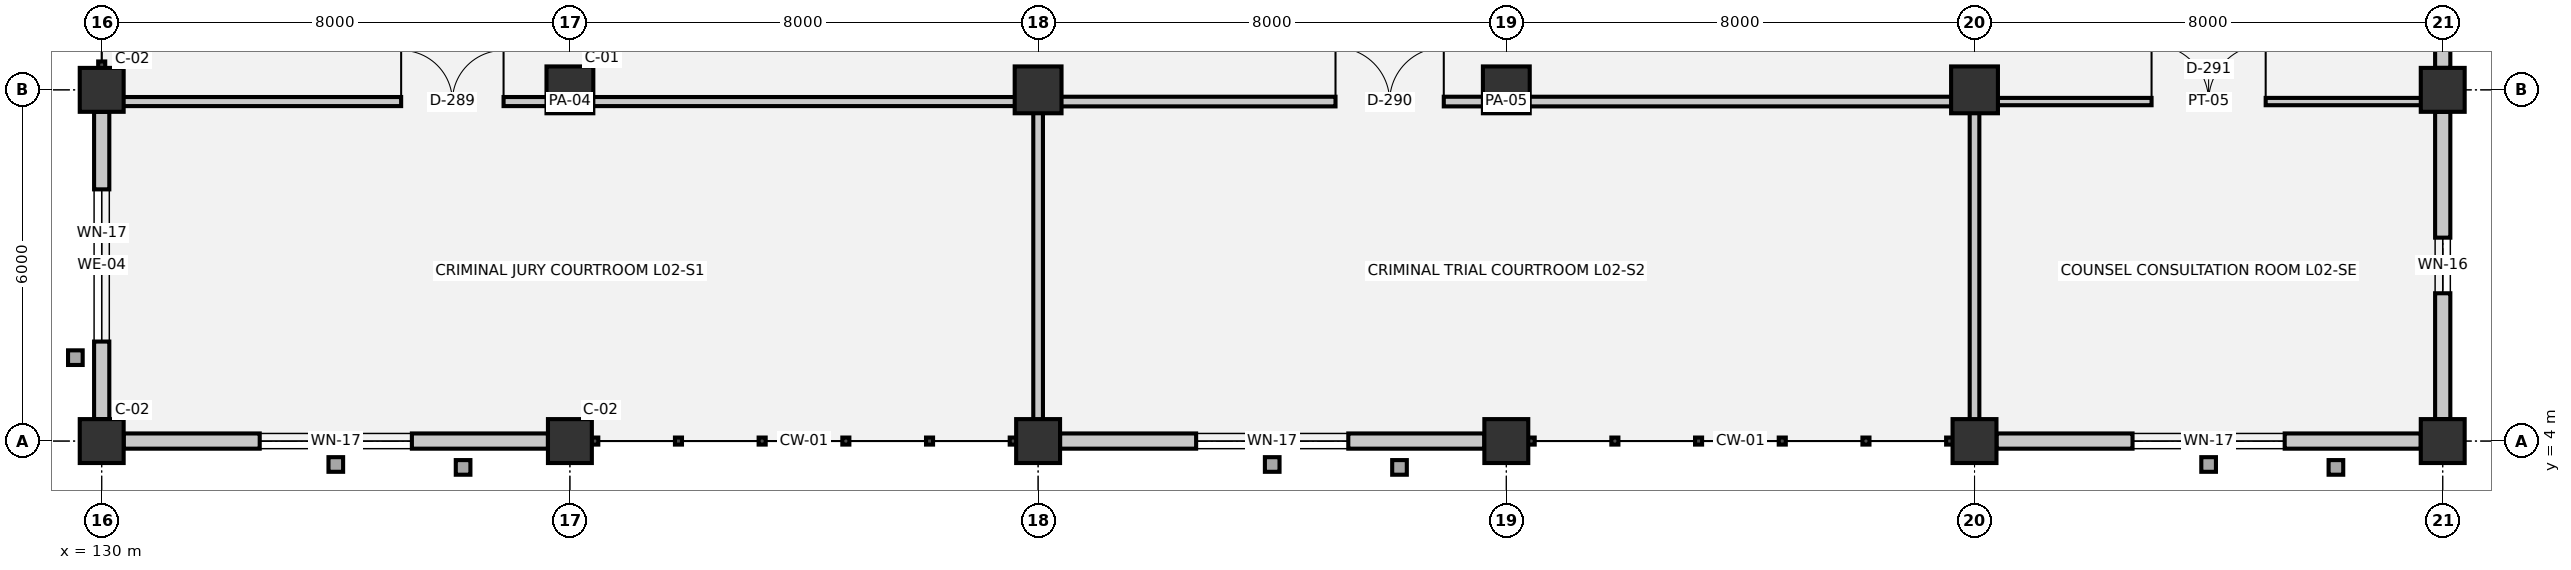
"""IFC4 building model, lengths in metres.
Left out: names, types, materials, properties, quantities, classifications, styles, units other than length and angle.
Written with IfcOpenShell. Run it as: python <this file> out.ifc"""

import sys

from ifc_helpers import new_model, si_unit, direction, frame, frame_2d, origin, origin_2d, place, context, subcontext, project, spatial, rectangle, extrude, element, fill, save


model = new_model("IFC4")
c1 = context("Model", 3, precision=1e-05, world=origin(), true_north=direction((0.0, 1.0)))
c2 = subcontext(c1, "Body", "Model", "MODEL_VIEW")
j1 = project(units=[si_unit("LENGTHUNIT", "METRE"), si_unit("PLANEANGLEUNIT", "RADIAN")], contexts=[c1])
p1 = place(None, origin())
s1 = spatial("IfcSite", under=j1, at=p1, CompositionType="ELEMENT")
p2 = place(p1, origin())
s2 = spatial("IfcBuilding", under=s1, at=p2, CompositionType="ELEMENT")
p3 = place(p2, frame((0.0, 0.0, 5.4)))
s3 = spatial("IfcBuildingStorey", under=s2, at=p3, CompositionType="ELEMENT", Elevation=5.4)
for number, where, z_axis, x_axis in (
    (1, (130.0, 4.0, 0.0), (0.0, 0.0, 1.0), (1.0, 0.0, 0.0)),
    (2, (130.0, 10.0, 0.0), (0.0, 0.0, 1.0), (1.0, 0.0, 0.0)),
    (3, (138.0, 4.0, 0.0), (0.0, 0.0, 1.0), (1.0, 0.0, 0.0)),
):
    element("IfcColumn", number, at=place(p3, frame(where, z_axis=z_axis, x_axis=x_axis)), inside=s3, PredefinedType="COLUMN", context=c2, shape_type="SweptSolid", body=[
        extrude(rectangle(XDim=0.75, YDim=0.75, at=origin_2d()), origin(), (0.0, 0.0, 1.0), 4.5),
    ])
p4 = place(p3, frame((138.0, 10.0, 0.0), z_axis=(0.0, 0.0, 1.0), x_axis=(1.0, 0.0, 0.0)))
e4 = element("IfcColumn", 4, at=p4, inside=s3, PredefinedType="COLUMN", context=c2, shape_type="SweptSolid", body=[
    extrude(rectangle(XDim=0.8, YDim=0.8, at=origin_2d()), origin(), (0.0, 0.0, 1.0), 4.5),
])
p5 = place(p3, frame((146.0, 4.0, 0.0), z_axis=(0.0, 0.0, 1.0), x_axis=(1.0, 0.0, 0.0)))
e5 = element("IfcColumn", 5, at=p5, inside=s3, PredefinedType="COLUMN", context=c2, shape_type="SweptSolid", body=[
    extrude(rectangle(XDim=0.75, YDim=0.75, at=origin_2d()), origin(), (0.0, 0.0, 1.0), 4.5),
])
p6 = place(p3, frame((146.0, 10.0, 0.0), z_axis=(0.0, 0.0, 1.0), x_axis=(1.0, 0.0, 0.0)))
e6 = element("IfcColumn", 6, at=p6, inside=s3, PredefinedType="COLUMN", context=c2, shape_type="SweptSolid", body=[
    extrude(rectangle(XDim=0.8, YDim=0.8, at=origin_2d()), origin(), (0.0, 0.0, 1.0), 4.5),
])
p7 = place(p3, frame((154.0, 4.0, 0.0), z_axis=(0.0, 0.0, 1.0), x_axis=(1.0, 0.0, 0.0)))
e7 = element("IfcColumn", 7, at=p7, inside=s3, PredefinedType="COLUMN", context=c2, shape_type="SweptSolid", body=[
    extrude(rectangle(XDim=0.75, YDim=0.75, at=origin_2d()), origin(), (0.0, 0.0, 1.0), 4.5),
])
p8 = place(p3, frame((154.0, 10.0, 0.0), z_axis=(0.0, 0.0, 1.0), x_axis=(1.0, 0.0, 0.0)))
e8 = element("IfcColumn", 8, at=p8, inside=s3, PredefinedType="COLUMN", context=c2, shape_type="SweptSolid", body=[
    extrude(rectangle(XDim=0.8, YDim=0.8, at=origin_2d()), origin(), (0.0, 0.0, 1.0), 4.5),
])
p9 = place(p3, frame((162.0, 4.0, 0.0), z_axis=(0.0, 0.0, 1.0), x_axis=(1.0, 0.0, 0.0)))
e9 = element("IfcColumn", 9, at=p9, inside=s3, PredefinedType="COLUMN", context=c2, shape_type="SweptSolid", body=[
    extrude(rectangle(XDim=0.75, YDim=0.75, at=origin_2d()), origin(), (0.0, 0.0, 1.0), 4.5),
])
p10 = place(p3, frame((162.0, 10.0, 0.0), z_axis=(0.0, 0.0, 1.0), x_axis=(1.0, 0.0, 0.0)))
e10 = element("IfcColumn", 10, at=p10, inside=s3, PredefinedType="COLUMN", context=c2, shape_type="SweptSolid", body=[
    extrude(rectangle(XDim=0.8, YDim=0.8, at=origin_2d()), origin(), (0.0, 0.0, 1.0), 4.5),
])
for number, where, z_axis, x_axis in (
    (11, (170.0, 4.0, 0.0), (0.0, 0.0, 1.0), (1.0, 0.0, 0.0)),
    (12, (170.0, 10.0, 0.0), (0.0, 0.0, 1.0), (1.0, 0.0, 0.0)),
):
    element("IfcColumn", number, at=place(p3, frame(where, z_axis=z_axis, x_axis=x_axis)), inside=s3, PredefinedType="COLUMN", context=c2, shape_type="SweptSolid", body=[
        extrude(rectangle(XDim=0.75, YDim=0.75, at=origin_2d()), origin(), (0.0, 0.0, 1.0), 4.5),
    ])
p11 = place(p3, frame((130.0, 4.375, 0.0), z_axis=(0.0, 0.0, 1.0), x_axis=(0.0, 1.0, 0.0)))
e13 = element("IfcWall", 13, at=p11, inside=s3, PredefinedType="SOLIDWALL", context=c2, shape_type="SweptSolid", body=[
    extrude(rectangle(XDim=5.25, YDim=0.26, at=frame_2d((2.625, 0.0))), origin(), (0.0, 0.0, 1.0), 3.23),
])
p12 = place(p11, frame((1.325, 0.0, 1.0)))
e14 = element("IfcOpeningElement", 14, at=p12, cuts=e13, PredefinedType="OPENING", context=c2, shape_type="SweptSolid", body=[
    extrude(rectangle(XDim=2.6, YDim=1.1, at=frame_2d((1.3, 0.55))), frame((0.0, 0.14, 0.0), z_axis=(0.0, -1.0, 0.0), x_axis=(1.0, 0.0, 0.0)), (0.0, 0.0, 1.0), 0.28),
])
p13 = place(p3, frame((170.0, 16.625, 0.0), z_axis=(0.0, 0.0, 1.0), x_axis=(0.0, -1.0, 0.0)))
e15 = element("IfcWall", 15, at=p13, inside=s3, PredefinedType="SOLIDWALL", context=c2, shape_type="SweptSolid", body=[
    extrude(rectangle(XDim=6.25, YDim=0.26, at=frame_2d((3.125, 0.0))), origin(), (0.0, 0.0, 1.0), 3.23),
])
p14 = place(p13, frame((2.65, 0.0, 1.0)))
e16 = element("IfcOpeningElement", 16, at=p14, cuts=e15, PredefinedType="OPENING", context=c2, shape_type="SweptSolid", body=[
    extrude(rectangle(XDim=0.95, YDim=1.1, at=frame_2d((0.475, 0.55))), frame((0.0, 0.14, 0.0), z_axis=(0.0, -1.0, 0.0), x_axis=(1.0, 0.0, 0.0)), (0.0, 0.0, 1.0), 0.28),
])
p15 = place(p3, frame((170.0, 9.625, 0.0), z_axis=(0.0, 0.0, 1.0), x_axis=(0.0, -1.0, 0.0)))
e17 = element("IfcWall", 17, at=p15, inside=s3, PredefinedType="SOLIDWALL", context=c2, shape_type="SweptSolid", body=[
    extrude(rectangle(XDim=5.25, YDim=0.26, at=frame_2d((2.625, 0.0))), origin(), (0.0, 0.0, 1.0), 3.23),
])
p16 = place(p15, frame((2.15, 0.0, 1.0)))
e18 = element("IfcOpeningElement", 18, at=p16, cuts=e17, PredefinedType="OPENING", context=c2, shape_type="SweptSolid", body=[
    extrude(rectangle(XDim=0.95, YDim=1.1, at=frame_2d((0.475, 0.55))), frame((0.0, 0.14, 0.0), z_axis=(0.0, -1.0, 0.0), x_axis=(1.0, 0.0, 0.0)), (0.0, 0.0, 1.0), 0.28),
])
p17 = place(p3, frame((169.625, 4.0, 0.0), z_axis=(0.0, 0.0, 1.0), x_axis=(-1.0, 0.0, 0.0)))
e19 = element("IfcWall", 19, at=p17, inside=s3, PredefinedType="SOLIDWALL", context=c2, shape_type="SweptSolid", body=[
    extrude(rectangle(XDim=7.25, YDim=0.26, at=frame_2d((3.625, 0.0))), origin(), (0.0, 0.0, 1.0), 3.23),
])
p18 = place(p17, frame((2.325, 0.0, 1.0)))
e20 = element("IfcOpeningElement", 20, at=p18, cuts=e19, PredefinedType="OPENING", context=c2, shape_type="SweptSolid", body=[
    extrude(rectangle(XDim=2.6, YDim=1.1, at=frame_2d((1.3, 0.55))), frame((0.0, 0.14, 0.0), z_axis=(0.0, -1.0, 0.0), x_axis=(1.0, 0.0, 0.0)), (0.0, 0.0, 1.0), 0.28),
])
p19 = place(p3, frame((153.625, 4.0, 0.0), z_axis=(0.0, 0.0, 1.0), x_axis=(-1.0, 0.0, 0.0)))
e21 = element("IfcWall", 21, at=p19, inside=s3, PredefinedType="SOLIDWALL", context=c2, shape_type="SweptSolid", body=[
    extrude(rectangle(XDim=7.25, YDim=0.26, at=frame_2d((3.625, 0.0))), origin(), (0.0, 0.0, 1.0), 3.23),
])
p20 = place(p19, frame((2.325, 0.0, 1.0)))
e22 = element("IfcOpeningElement", 22, at=p20, cuts=e21, PredefinedType="OPENING", context=c2, shape_type="SweptSolid", body=[
    extrude(rectangle(XDim=2.6, YDim=1.1, at=frame_2d((1.3, 0.55))), frame((0.0, 0.14, 0.0), z_axis=(0.0, -1.0, 0.0), x_axis=(1.0, 0.0, 0.0)), (0.0, 0.0, 1.0), 0.28),
])
p21 = place(p3, frame((137.625, 4.0, 0.0), z_axis=(0.0, 0.0, 1.0), x_axis=(-1.0, 0.0, 0.0)))
e23 = element("IfcWall", 23, at=p21, inside=s3, PredefinedType="SOLIDWALL", context=c2, shape_type="SweptSolid", body=[
    extrude(rectangle(XDim=7.25, YDim=0.26, at=frame_2d((3.625, 0.0))), origin(), (0.0, 0.0, 1.0), 3.23),
])
p22 = place(p21, frame((2.325, 0.0, 1.0)))
e24 = element("IfcOpeningElement", 24, at=p22, cuts=e23, PredefinedType="OPENING", context=c2, shape_type="SweptSolid", body=[
    extrude(rectangle(XDim=2.6, YDim=1.1, at=frame_2d((1.3, 0.55))), frame((0.0, 0.14, 0.0), z_axis=(0.0, -1.0, 0.0), x_axis=(1.0, 0.0, 0.0)), (0.0, 0.0, 1.0), 0.28),
])
p23 = place(p3, frame((130.08, 9.8, 0.0), z_axis=(0.0, 0.0, 1.0), x_axis=(1.0, 0.0, 0.0)))
e25 = element("IfcWall", 25, at=p23, inside=s3, PredefinedType="PARTITIONING", context=c2, shape_type="SweptSolid", body=[
    extrude(rectangle(XDim=15.84, YDim=0.155, at=frame_2d((7.92, 0.0))), origin(), (0.0, 0.0, 1.0), 3.45),
])
p24 = place(p23, frame((5.037, 0.0, 0.0)))
e26 = element("IfcOpeningElement", 26, at=p24, cuts=e25, PredefinedType="OPENING", context=c2, shape_type="SweptSolid", body=[
    extrude(rectangle(XDim=1.75, YDim=2.3, at=frame_2d((0.875, 1.15))), frame((0.0, 0.087, 0.0), z_axis=(0.0, -1.0, 0.0), x_axis=(1.0, 0.0, 0.0)), (0.0, 0.0, 1.0), 0.175),
])
p25 = place(p3, frame((146.08, 9.8, 0.0), z_axis=(0.0, 0.0, 1.0), x_axis=(1.0, 0.0, 0.0)))
e27 = element("IfcWall", 27, at=p25, inside=s3, PredefinedType="PARTITIONING", context=c2, shape_type="SweptSolid", body=[
    extrude(rectangle(XDim=15.84, YDim=0.165, at=frame_2d((7.92, 0.0))), origin(), (0.0, 0.0, 1.0), 3.45),
])
p26 = place(p25, frame((5.001, 0.0, 0.0)))
e28 = element("IfcOpeningElement", 28, at=p26, cuts=e27, PredefinedType="OPENING", context=c2, shape_type="SweptSolid", body=[
    extrude(rectangle(XDim=1.85, YDim=2.3, at=frame_2d((0.925, 1.15))), frame((0.0, 0.093, 0.0), z_axis=(0.0, -1.0, 0.0), x_axis=(1.0, 0.0, 0.0)), (0.0, 0.0, 1.0), 0.185),
])
p27 = place(p3, frame((162.08, 9.8, 0.0), z_axis=(0.0, 0.0, 1.0), x_axis=(1.0, 0.0, 0.0)))
e29 = element("IfcWall", 29, at=p27, inside=s3, PredefinedType="PARTITIONING", context=c2, shape_type="SweptSolid", body=[
    extrude(rectangle(XDim=7.84, YDim=0.125, at=frame_2d((3.92, 0.0))), origin(), (0.0, 0.0, 1.0), 3.45),
])
p28 = place(p27, frame((2.945, 0.0, 0.0)))
e30 = element("IfcOpeningElement", 30, at=p28, cuts=e29, PredefinedType="OPENING", context=c2, shape_type="SweptSolid", body=[
    extrude(rectangle(XDim=1.95, YDim=2.35, at=frame_2d((0.975, 1.175))), frame((0.0, 0.073, 0.0), z_axis=(0.0, -1.0, 0.0), x_axis=(1.0, 0.0, 0.0)), (0.0, 0.0, 1.0), 0.145),
])
for number, where, z_axis, x_axis in (
    (31, (146.0, 4.08, 0.0), (0.0, 0.0, 1.0), (0.0, 1.0, 0.0)),
    (32, (162.0, 4.08, 0.0), (0.0, 0.0, 1.0), (0.0, 1.0, 0.0)),
):
    element("IfcWall", number, at=place(p3, frame(where, z_axis=z_axis, x_axis=x_axis)), inside=s3, PredefinedType="PARTITIONING", context=c2, shape_type="SweptSolid", body=[
        extrude(rectangle(XDim=5.64, YDim=0.165, at=frame_2d((2.82, 0.0))), origin(), (0.0, 0.0, 1.0), 3.55),
    ])
p29 = place(p12, origin())
e33 = element("IfcWindow", 33, at=p29, inside=s3, PartitioningType="SINGLE_PANEL", PredefinedType="WINDOW", context=c2, shape_type="SweptSolid", body=[
    extrude(rectangle(XDim=2.6, YDim=1.1, at=frame_2d((1.3, 0.55))), frame((0.0, 0.03, 0.0), z_axis=(0.0, -1.0, 0.0), x_axis=(1.0, 0.0, 0.0)), (0.0, 0.0, 1.0), 0.06),
])
fill(e14, e33)
p30 = place(p16, origin())
e34 = element("IfcWindow", 34, at=p30, inside=s3, PartitioningType="SINGLE_PANEL", PredefinedType="WINDOW", context=c2, shape_type="SweptSolid", body=[
    extrude(rectangle(XDim=0.95, YDim=1.1, at=frame_2d((0.475, 0.55))), frame((0.0, 0.03, 0.0), z_axis=(0.0, -1.0, 0.0), x_axis=(1.0, 0.0, 0.0)), (0.0, 0.0, 1.0), 0.06),
])
fill(e18, e34)
p31 = place(p18, origin())
e35 = element("IfcWindow", 35, at=p31, inside=s3, PartitioningType="SINGLE_PANEL", PredefinedType="WINDOW", context=c2, shape_type="SweptSolid", body=[
    extrude(rectangle(XDim=2.6, YDim=1.1, at=frame_2d((1.3, 0.55))), frame((0.0, 0.03, 0.0), z_axis=(0.0, -1.0, 0.0), x_axis=(1.0, 0.0, 0.0)), (0.0, 0.0, 1.0), 0.06),
])
fill(e20, e35)
p32 = place(p20, origin())
e36 = element("IfcWindow", 36, at=p32, inside=s3, PartitioningType="SINGLE_PANEL", PredefinedType="WINDOW", context=c2, shape_type="SweptSolid", body=[
    extrude(rectangle(XDim=2.6, YDim=1.1, at=frame_2d((1.3, 0.55))), frame((0.0, 0.03, 0.0), z_axis=(0.0, -1.0, 0.0), x_axis=(1.0, 0.0, 0.0)), (0.0, 0.0, 1.0), 0.06),
])
fill(e22, e36)
p33 = place(p22, origin())
e37 = element("IfcWindow", 37, at=p33, inside=s3, PartitioningType="SINGLE_PANEL", PredefinedType="WINDOW", context=c2, shape_type="SweptSolid", body=[
    extrude(rectangle(XDim=2.6, YDim=1.1, at=frame_2d((1.3, 0.55))), frame((0.0, 0.03, 0.0), z_axis=(0.0, -1.0, 0.0), x_axis=(1.0, 0.0, 0.0)), (0.0, 0.0, 1.0), 0.06),
])
fill(e24, e37)
p34 = place(p24, origin())
e38 = element("IfcDoor", 38, at=p34, inside=s3, OperationType="DOUBLE_DOOR_SINGLE_SWING", PredefinedType="DOOR", context=c2, shape_type="SweptSolid", body=[
    extrude(rectangle(XDim=1.75, YDim=2.3, at=frame_2d((0.875, 1.15))), frame((0.0, 0.025, 0.0), z_axis=(0.0, -1.0, 0.0), x_axis=(1.0, 0.0, 0.0)), (0.0, 0.0, 1.0), 0.05),
])
fill(e26, e38)
p35 = place(p26, origin())
e39 = element("IfcDoor", 39, at=p35, inside=s3, OperationType="DOUBLE_DOOR_SINGLE_SWING", PredefinedType="DOOR", context=c2, shape_type="SweptSolid", body=[
    extrude(rectangle(XDim=1.85, YDim=2.3, at=frame_2d((0.925, 1.15))), frame((0.0, 0.025, 0.0), z_axis=(0.0, -1.0, 0.0), x_axis=(1.0, 0.0, 0.0)), (0.0, 0.0, 1.0), 0.05),
])
fill(e28, e39)
p36 = place(p28, origin())
e40 = element("IfcDoor", 40, at=p36, inside=s3, OperationType="DOUBLE_DOOR_SINGLE_SWING", PredefinedType="DOOR", context=c2, shape_type="SweptSolid", body=[
    extrude(rectangle(XDim=1.95, YDim=2.35, at=frame_2d((0.975, 1.175))), frame((0.0, 0.025, 0.0), z_axis=(0.0, -1.0, 0.0), x_axis=(1.0, 0.0, 0.0)), (0.0, 0.0, 1.0), 0.05),
])
fill(e30, e40)
save(model, sys.argv[1])
